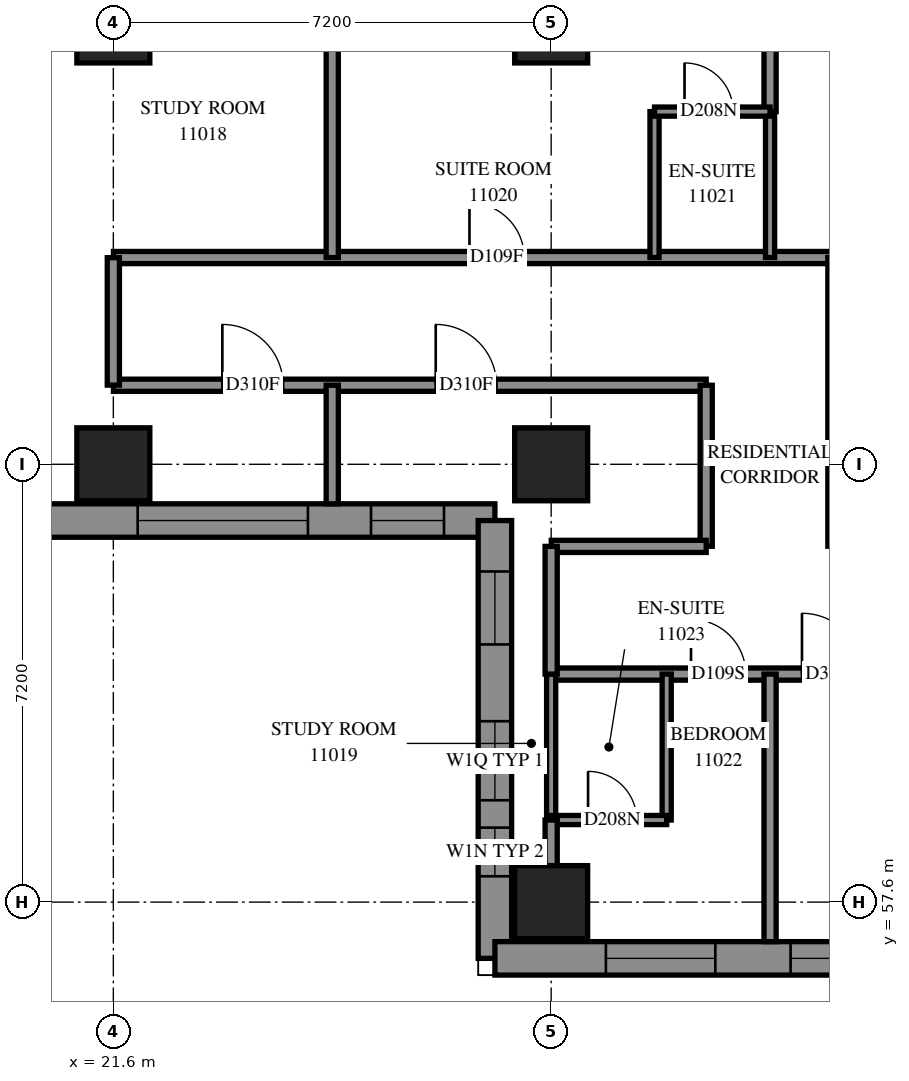
"""IFC4 building model, lengths in metres.
Left out: names, types, materials, properties, quantities, classifications, styles, units other than length and angle.
Written with IfcOpenShell. Run it as: python <this file> out.ifc"""

import sys

from ifc_helpers import new_model, si_unit, direction, frame, frame_2d, origin, origin_2d, place, context, subcontext, project, spatial, polyline, rectangle, outline, extrude, element, fill, save


model = new_model("IFC4")
c1 = context("Model", 3, precision=1e-05, world=origin(), true_north=direction((0.0, 1.0)))
c2 = subcontext(c1, "Body", "Model", "MODEL_VIEW")
j1 = project(units=[si_unit("LENGTHUNIT", "METRE"), si_unit("PLANEANGLEUNIT", "RADIAN")], contexts=[c1])
p1 = place(None, origin())
s1 = spatial("IfcSite", under=j1, at=p1, CompositionType="ELEMENT")
p2 = place(p1, origin())
s2 = spatial("IfcBuilding", under=s1, at=p2, CompositionType="ELEMENT")
p3 = place(p2, frame((0.0, 0.0, 44.0)))
s3 = spatial("IfcBuildingStorey", under=s2, at=p3, CompositionType="ELEMENT", Elevation=44.0)
for number, where, z_axis, x_axis in (
    (1, (21.6, 64.8, 0.0), (0.0, 0.0, 1.0), (1.0, 0.0, 0.0)),
    (2, (21.6, 72.0, 0.0), (0.0, 0.0, 1.0), (1.0, 0.0, 0.0)),
    (3, (28.8, 57.6, 0.0), (0.0, 0.0, 1.0), (1.0, 0.0, 0.0)),
    (4, (28.8, 64.8, 0.0), (0.0, 0.0, 1.0), (1.0, 0.0, 0.0)),
    (5, (28.8, 72.0, 0.0), (0.0, 0.0, 1.0), (1.0, 0.0, 0.0)),
):
    element("IfcColumn", number, at=place(p3, frame(where, z_axis=z_axis, x_axis=x_axis)), inside=s3, PredefinedType="COLUMN", context=c2, shape_type="SweptSolid", body=[
        extrude(rectangle(XDim=1.2, YDim=1.2, at=origin_2d()), origin(), (0.0, 0.0, 1.0), 3.1),
    ])
p4 = place(p3, frame((19.624, 63.875, 0.0), z_axis=(0.0, 0.0, 1.0), x_axis=(1.0, 0.0, 0.0)))
e6 = element("IfcWall", 6, at=p4, inside=s3, PredefinedType="SOLIDWALL", context=c2, shape_type="SweptSolid", body=[
    extrude(outline(polyline([(-0.275, -0.275), (7.976, -0.275), (8.526, 0.275), (0.275, 0.275), (-0.275, -0.275)])), origin(), (0.0, 0.0, 1.0), 3.1),
])
p5 = place(p4, frame((2.376, 0.0, 0.5)))
e7 = element("IfcOpeningElement", 7, at=p5, cuts=e6, PredefinedType="OPENING", context=c2, shape_type="SweptSolid", body=[
    extrude(rectangle(XDim=2.8, YDim=2.45, at=frame_2d((1.4, 1.225))), frame((0.0, 0.285, 0.0), z_axis=(0.0, -1.0, 0.0), x_axis=(1.0, 0.0, 0.0)), (0.0, 0.0, 1.0), 0.57),
])
p6 = place(p4, frame((6.213, 0.0, 0.5)))
e8 = element("IfcOpeningElement", 8, at=p6, cuts=e6, PredefinedType="OPENING", context=c2, shape_type="SweptSolid", body=[
    extrude(rectangle(XDim=1.2, YDim=2.45, at=frame_2d((0.6, 1.225))), frame((0.0, 0.285, 0.0), z_axis=(0.0, -1.0, 0.0), x_axis=(1.0, 0.0, 0.0)), (0.0, 0.0, 1.0), 0.57),
])
p7 = place(p3, frame((27.875, 63.875, 0.0), z_axis=(0.0, 0.0, 1.0), x_axis=(0.0, -1.0, 0.0)))
e9 = element("IfcWall", 9, at=p7, inside=s3, PredefinedType="SOLIDWALL", context=c2, shape_type="SweptSolid", body=[
    extrude(outline(polyline([(0.275, -0.275), (7.475, -0.275), (6.925, 0.275), (-0.275, 0.275), (0.275, -0.275)])), origin(), (0.0, 0.0, 1.0), 3.1),
])
p8 = place(p7, frame((0.838, 0.0, 0.5)))
e10 = element("IfcOpeningElement", 10, at=p8, cuts=e9, PredefinedType="OPENING", context=c2, shape_type="SweptSolid", body=[
    extrude(rectangle(XDim=1.2, YDim=2.45, at=frame_2d((0.6, 1.225))), frame((0.0, 0.285, 0.0), z_axis=(0.0, -1.0, 0.0), x_axis=(1.0, 0.0, 0.0)), (0.0, 0.0, 1.0), 0.57),
])
p9 = place(p7, frame((3.3, 0.0, 0.45)))
e11 = element("IfcOpeningElement", 11, at=p9, cuts=e9, PredefinedType="OPENING", context=c2, shape_type="SweptSolid", body=[
    extrude(rectangle(XDim=1.3, YDim=2.5, at=frame_2d((0.65, 1.25))), frame((0.0, 0.285, 0.0), z_axis=(0.0, -1.0, 0.0), x_axis=(1.0, 0.0, 0.0)), (0.0, 0.0, 1.0), 0.57),
])
p10 = place(p7, frame((5.05, 0.0, 0.45)))
e12 = element("IfcOpeningElement", 12, at=p10, cuts=e9, PredefinedType="OPENING", context=c2, shape_type="SweptSolid", body=[
    extrude(rectangle(XDim=0.8, YDim=2.5, at=frame_2d((0.4, 1.25))), frame((0.0, 0.285, 0.0), z_axis=(0.0, -1.0, 0.0), x_axis=(1.0, 0.0, 0.0)), (0.0, 0.0, 1.0), 0.57),
])
p11 = place(p3, frame((27.875, 56.675, 0.0), z_axis=(0.0, 0.0, 1.0), x_axis=(1.0, 0.0, 0.0)))
e13 = element("IfcWall", 13, at=p11, inside=s3, PredefinedType="SOLIDWALL", context=c2, shape_type="SweptSolid", body=[
    extrude(outline(polyline([(-0.275, -0.275), (6.925, -0.275), (7.475, 0.275), (0.275, 0.275), (-0.275, -0.275)])), origin(), (0.0, 0.0, 1.0), 3.1),
])
p12 = place(p11, frame((1.825, 0.0, 0.6)))
e14 = element("IfcOpeningElement", 14, at=p12, cuts=e13, PredefinedType="OPENING", context=c2, shape_type="SweptSolid", body=[
    extrude(rectangle(XDim=1.8, YDim=1.9, at=frame_2d((0.9, 0.95))), frame((0.0, 0.285, 0.0), z_axis=(0.0, -1.0, 0.0), x_axis=(1.0, 0.0, 0.0)), (0.0, 0.0, 1.0), 0.57),
])
p13 = place(p11, frame((4.862, 0.0, 0.6)))
e15 = element("IfcOpeningElement", 15, at=p13, cuts=e13, PredefinedType="OPENING", context=c2, shape_type="SweptSolid", body=[
    extrude(rectangle(XDim=1.8, YDim=1.9, at=frame_2d((0.9, 0.95))), frame((0.0, 0.285, 0.0), z_axis=(0.0, -1.0, 0.0), x_axis=(1.0, 0.0, 0.0)), (0.0, 0.0, 1.0), 0.57),
])
p14 = place(p3, frame((28.8, 61.35, 0.0), z_axis=(0.0, 0.0, 1.0), x_axis=(1.0, 0.0, 0.0)))
e16 = element("IfcWall", 16, at=p14, inside=s3, PredefinedType="PARTITIONING", context=c2, shape_type="SweptSolid", body=[
    extrude(rectangle(XDim=24.15, YDim=0.2, at=frame_2d((12.075, 0.0))), origin(), (0.0, 0.0, 1.0), 3.1),
])
p15 = place(p14, frame((2.3, 0.0, 0.0)))
e17 = element("IfcOpeningElement", 17, at=p15, cuts=e16, PredefinedType="OPENING", context=c2, shape_type="SweptSolid", body=[
    extrude(rectangle(XDim=0.9, YDim=2.1, at=frame_2d((0.45, 1.05))), frame((0.0, 0.11, 0.0), z_axis=(0.0, -1.0, 0.0), x_axis=(1.0, 0.0, 0.0)), (0.0, 0.0, 1.0), 0.22),
])
p16 = place(p14, frame((4.125, 0.0, 0.0)))
e18 = element("IfcOpeningElement", 18, at=p16, cuts=e16, PredefinedType="OPENING", context=c2, shape_type="SweptSolid", body=[
    extrude(rectangle(XDim=1.0, YDim=2.1, at=frame_2d((0.5, 1.05))), frame((0.0, 0.11, 0.0), z_axis=(0.0, -1.0, 0.0), x_axis=(1.0, 0.0, 0.0)), (0.0, 0.0, 1.0), 0.22),
])
p17 = place(p14, frame((11.061, 0.0, 0.0)))
e19 = element("IfcOpeningElement", 19, at=p17, cuts=e16, PredefinedType="OPENING", context=c2, shape_type="SweptSolid", body=[
    extrude(rectangle(XDim=0.9, YDim=2.1, at=frame_2d((0.45, 1.05))), frame((0.0, 0.11, 0.0), z_axis=(0.0, -1.0, 0.0), x_axis=(1.0, 0.0, 0.0)), (0.0, 0.0, 1.0), 0.22),
])
p18 = place(p14, frame((16.7, 0.0, 0.0)))
e20 = element("IfcOpeningElement", 20, at=p18, cuts=e16, PredefinedType="OPENING", context=c2, shape_type="SweptSolid", body=[
    extrude(rectangle(XDim=0.9, YDim=2.1, at=frame_2d((0.45, 1.05))), frame((0.0, 0.11, 0.0), z_axis=(0.0, -1.0, 0.0), x_axis=(1.0, 0.0, 0.0)), (0.0, 0.0, 1.0), 0.22),
])
p19 = place(p14, frame((18.508, 0.0, 0.0)))
e21 = element("IfcOpeningElement", 21, at=p19, cuts=e16, PredefinedType="OPENING", context=c2, shape_type="SweptSolid", body=[
    extrude(rectangle(XDim=1.0, YDim=2.1, at=frame_2d((0.5, 1.05))), frame((0.0, 0.11, 0.0), z_axis=(0.0, -1.0, 0.0), x_axis=(1.0, 0.0, 0.0)), (0.0, 0.0, 1.0), 0.22),
])
p20 = place(p14, frame((22.882, 0.0, 0.0)))
e22 = element("IfcOpeningElement", 22, at=p20, cuts=e16, PredefinedType="OPENING", context=c2, shape_type="SweptSolid", body=[
    extrude(rectangle(XDim=1.0, YDim=2.1, at=frame_2d((0.5, 1.05))), frame((0.0, 0.11, 0.0), z_axis=(0.0, -1.0, 0.0), x_axis=(1.0, 0.0, 0.0)), (0.0, 0.0, 1.0), 0.22),
])
p21 = place(p3, frame((21.602, 68.2, 0.0), z_axis=(0.0, 0.0, 1.0), x_axis=(1.0, 0.0, 0.0)))
e23 = element("IfcWall", 23, at=p21, inside=s3, PredefinedType="PARTITIONING", context=c2, shape_type="SweptSolid", body=[
    extrude(rectangle(XDim=11.848, YDim=0.2, at=frame_2d((5.924, 0.0))), origin(), (0.0, 0.0, 1.0), 3.1),
])
p22 = place(p21, frame((5.855, 0.0, 0.0)))
e24 = element("IfcOpeningElement", 24, at=p22, cuts=e23, PredefinedType="OPENING", context=c2, shape_type="SweptSolid", body=[
    extrude(rectangle(XDim=0.9, YDim=2.1, at=frame_2d((0.45, 1.05))), frame((0.0, 0.11, 0.0), z_axis=(0.0, -1.0, 0.0), x_axis=(1.0, 0.0, 0.0)), (0.0, 0.0, 1.0), 0.22),
])
p23 = place(p3, frame((21.602, 66.1, 0.0), z_axis=(0.0, 0.0, 1.0), x_axis=(1.0, 0.0, 0.0)))
e25 = element("IfcWall", 25, at=p23, inside=s3, PredefinedType="PARTITIONING", context=c2, shape_type="SweptSolid", body=[
    extrude(rectangle(XDim=9.748, YDim=0.2, at=frame_2d((4.874, 0.0))), origin(), (0.0, 0.0, 1.0), 3.1),
])
p24 = place(p23, frame((1.791, 0.0, 0.0)))
e26 = element("IfcOpeningElement", 26, at=p24, cuts=e25, PredefinedType="OPENING", context=c2, shape_type="SweptSolid", body=[
    extrude(rectangle(XDim=1.0, YDim=2.1, at=frame_2d((0.5, 1.05))), frame((0.0, 0.11, 0.0), z_axis=(0.0, -1.0, 0.0), x_axis=(1.0, 0.0, 0.0)), (0.0, 0.0, 1.0), 0.22),
])
p25 = place(p23, frame((5.3, 0.0, 0.0)))
e27 = element("IfcOpeningElement", 27, at=p25, cuts=e25, PredefinedType="OPENING", context=c2, shape_type="SweptSolid", body=[
    extrude(rectangle(XDim=1.0, YDim=2.1, at=frame_2d((0.5, 1.05))), frame((0.0, 0.11, 0.0), z_axis=(0.0, -1.0, 0.0), x_axis=(1.0, 0.0, 0.0)), (0.0, 0.0, 1.0), 0.22),
])
p26 = place(p3, frame((33.45, 63.452, 0.0), z_axis=(0.0, 0.0, 1.0), x_axis=(0.0, 1.0, 0.0)))
e28 = element("IfcWall", 28, at=p26, inside=s3, PredefinedType="PARTITIONING", context=c2, shape_type="SweptSolid", body=[
    extrude(rectangle(XDim=4.748, YDim=0.2, at=frame_2d((2.374, 0.0))), origin(), (0.0, 0.0, 1.0), 3.1),
])
p27 = place(p3, frame((25.2, 68.2, 0.0), z_axis=(0.0, 0.0, 1.0), x_axis=(0.0, 1.0, 0.0)))
e29 = element("IfcWall", 29, at=p27, inside=s3, PredefinedType="PARTITIONING", context=c2, shape_type="SweptSolid", body=[
    extrude(rectangle(XDim=4.69, YDim=0.2, at=frame_2d((2.345, 0.0))), origin(), (0.0, 0.0, 1.0), 3.1),
])
p28 = place(p3, frame((32.4, 56.95, 0.0), z_axis=(0.0, 0.0, 1.0), x_axis=(0.0, 1.0, 0.0)))
e30 = element("IfcWall", 30, at=p28, inside=s3, PredefinedType="PARTITIONING", context=c2, shape_type="SweptSolid", body=[
    extrude(rectangle(XDim=4.4, YDim=0.2, at=frame_2d((2.2, 0.0))), origin(), (0.0, 0.0, 1.0), 3.1),
])
p29 = place(p3, frame((31.35, 63.452, 0.0), z_axis=(0.0, 0.0, 1.0), x_axis=(0.0, 1.0, 0.0)))
e31 = element("IfcWall", 31, at=p29, inside=s3, PredefinedType="PARTITIONING", context=c2, shape_type="SweptSolid", body=[
    extrude(rectangle(XDim=2.648, YDim=0.2, at=frame_2d((1.324, 0.0))), origin(), (0.0, 0.0, 1.0), 3.1),
])
p30 = place(p3, frame((28.802, 63.45, 0.0), z_axis=(0.0, 0.0, 1.0), x_axis=(1.0, 0.0, 0.0)))
e32 = element("IfcWall", 32, at=p30, inside=s3, PredefinedType="PARTITIONING", context=c2, shape_type="SweptSolid", body=[
    extrude(rectangle(XDim=2.548, YDim=0.2, at=frame_2d((1.274, 0.0))), origin(), (0.0, 0.0, 1.0), 3.1),
])
p31 = place(p3, frame((30.7, 58.95, 0.0), z_axis=(0.0, 0.0, 1.0), x_axis=(0.0, 1.0, 0.0)))
e33 = element("IfcWall", 33, at=p31, inside=s3, PredefinedType="PARTITIONING", context=c2, shape_type="SweptSolid", body=[
    extrude(rectangle(XDim=2.4, YDim=0.15, at=frame_2d((1.2, 0.0))), origin(), (0.0, 0.0, 1.0), 3.1),
])
p32 = place(p3, frame((28.8, 58.95, 0.0), z_axis=(0.0, 0.0, 1.0), x_axis=(0.0, 1.0, 0.0)))
e34 = element("IfcWall", 34, at=p32, inside=s3, PredefinedType="PARTITIONING", context=c2, shape_type="SweptSolid", body=[
    extrude(rectangle(XDim=2.4, YDim=0.15, at=frame_2d((1.2, 0.0))), origin(), (0.0, 0.0, 1.0), 2.6),
])
for number, where, z_axis, x_axis in (
    (35, (30.5, 68.2, 0.0), (0.0, 0.0, 1.0), (0.0, 1.0, 0.0)),
    (36, (32.4, 68.2, 0.0), (0.0, 0.0, 1.0), (0.0, 1.0, 0.0)),
):
    element("IfcWall", number, at=place(p3, frame(where, z_axis=z_axis, x_axis=x_axis)), inside=s3, PredefinedType="PARTITIONING", context=c2, shape_type="SweptSolid", body=[
        extrude(rectangle(XDim=2.4, YDim=0.15, at=frame_2d((1.2, 0.0))), origin(), (0.0, 0.0, 1.0), 3.1),
    ])
p33 = place(p3, frame((32.4, 70.6, 0.0), z_axis=(0.0, 0.0, 1.0), x_axis=(0.0, 1.0, 0.0)))
e37 = element("IfcWall", 37, at=p33, inside=s3, PredefinedType="PARTITIONING", context=c2, shape_type="SweptSolid", body=[
    extrude(rectangle(XDim=2.243, YDim=0.2, at=frame_2d((1.121, 0.0))), origin(), (0.0, 0.0, 1.0), 3.1),
])
p34 = place(p3, frame((28.8, 61.35, 0.0), z_axis=(0.0, 0.0, 1.0), x_axis=(0.0, 1.0, 0.0)))
e38 = element("IfcWall", 38, at=p34, inside=s3, PredefinedType="PARTITIONING", context=c2, shape_type="SweptSolid", body=[
    extrude(rectangle(XDim=2.1, YDim=0.2, at=frame_2d((1.05, 0.0))), origin(), (0.0, 0.0, 1.0), 2.6),
])
p35 = place(p3, frame((21.6, 66.102, 0.0), z_axis=(0.0, 0.0, 1.0), x_axis=(0.0, 1.0, 0.0)))
e39 = element("IfcWall", 39, at=p35, inside=s3, PredefinedType="PARTITIONING", context=c2, shape_type="SweptSolid", body=[
    extrude(rectangle(XDim=2.096, YDim=0.2, at=frame_2d((1.048, 0.0))), origin(), (0.0, 0.0, 1.0), 2.6),
])
p36 = place(p3, frame((28.8, 58.95, 0.0), z_axis=(0.0, 0.0, 1.0), x_axis=(1.0, 0.0, 0.0)))
e40 = element("IfcWall", 40, at=p36, inside=s3, PredefinedType="PARTITIONING", context=c2, shape_type="SweptSolid", body=[
    extrude(rectangle(XDim=1.9, YDim=0.15, at=frame_2d((0.95, 0.0))), origin(), (0.0, 0.0, 1.0), 3.1),
])
p37 = place(p36, frame((0.607, 0.0, 0.0)))
e41 = element("IfcOpeningElement", 41, at=p37, cuts=e40, PredefinedType="OPENING", context=c2, shape_type="SweptSolid", body=[
    extrude(rectangle(XDim=0.8, YDim=2.1, at=frame_2d((0.4, 1.05))), frame((0.0, 0.085, 0.0), z_axis=(0.0, -1.0, 0.0), x_axis=(1.0, 0.0, 0.0)), (0.0, 0.0, 1.0), 0.17),
])
p38 = place(p3, frame((30.5, 70.6, 0.0), z_axis=(0.0, 0.0, 1.0), x_axis=(1.0, 0.0, 0.0)))
e42 = element("IfcWall", 42, at=p38, inside=s3, PredefinedType="PARTITIONING", context=c2, shape_type="SweptSolid", body=[
    extrude(rectangle(XDim=1.9, YDim=0.15, at=frame_2d((0.95, 0.0))), origin(), (0.0, 0.0, 1.0), 3.1),
])
p39 = place(p38, frame((0.493, 0.0, 0.0)))
e43 = element("IfcOpeningElement", 43, at=p39, cuts=e42, PredefinedType="OPENING", context=c2, shape_type="SweptSolid", body=[
    extrude(rectangle(XDim=0.8, YDim=2.1, at=frame_2d((0.4, 1.05))), frame((0.0, 0.085, 0.0), z_axis=(0.0, -1.0, 0.0), x_axis=(1.0, 0.0, 0.0)), (0.0, 0.0, 1.0), 0.17),
])
p40 = place(p3, frame((25.2, 64.15, 0.0), z_axis=(0.0, 0.0, 1.0), x_axis=(0.0, 1.0, 0.0)))
e44 = element("IfcWall", 44, at=p40, inside=s3, PredefinedType="PARTITIONING", context=c2, shape_type="SweptSolid", body=[
    extrude(rectangle(XDim=1.95, YDim=0.2, at=frame_2d((0.975, 0.0))), origin(), (0.0, 0.0, 1.0), 3.1),
])
p41 = place(p3, frame((28.8, 58.2, 0.0), z_axis=(0.0, 0.0, 1.0), x_axis=(0.0, 1.0, 0.0)))
e45 = element("IfcWall", 45, at=p41, inside=s3, PredefinedType="PARTITIONING", context=c2, shape_type="SweptSolid", body=[
    extrude(rectangle(XDim=0.75, YDim=0.2, at=frame_2d((0.375, 0.0))), origin(), (0.0, 0.0, 1.0), 2.6),
])
p42 = place(p5, origin())
e46 = element("IfcWindow", 46, at=p42, inside=s3, PartitioningType="SINGLE_PANEL", PredefinedType="WINDOW", context=c2, shape_type="SweptSolid", body=[
    extrude(rectangle(XDim=2.8, YDim=2.45, at=frame_2d((1.4, 1.225))), frame((0.0, 0.155, 0.0), z_axis=(0.0, -1.0, 0.0), x_axis=(1.0, 0.0, 0.0)), (0.0, 0.0, 1.0), 0.06),
])
fill(e7, e46)
p43 = place(p6, origin())
e47 = element("IfcWindow", 47, at=p43, inside=s3, PartitioningType="SINGLE_PANEL", PredefinedType="WINDOW", context=c2, shape_type="SweptSolid", body=[
    extrude(rectangle(XDim=1.2, YDim=2.45, at=frame_2d((0.6, 1.225))), frame((0.0, 0.155, 0.0), z_axis=(0.0, -1.0, 0.0), x_axis=(1.0, 0.0, 0.0)), (0.0, 0.0, 1.0), 0.06),
])
fill(e8, e47)
p44 = place(p8, origin())
e48 = element("IfcWindow", 48, at=p44, inside=s3, PartitioningType="SINGLE_PANEL", PredefinedType="WINDOW", context=c2, shape_type="SweptSolid", body=[
    extrude(rectangle(XDim=1.2, YDim=2.45, at=frame_2d((0.6, 1.225))), frame((0.0, 0.155, 0.0), z_axis=(0.0, -1.0, 0.0), x_axis=(1.0, 0.0, 0.0)), (0.0, 0.0, 1.0), 0.06),
])
fill(e10, e48)
p45 = place(p12, origin())
e49 = element("IfcWindow", 49, at=p45, inside=s3, PartitioningType="SINGLE_PANEL", PredefinedType="WINDOW", context=c2, shape_type="SweptSolid", body=[
    extrude(rectangle(XDim=1.8, YDim=1.9, at=frame_2d((0.9, 0.95))), frame((0.0, 0.155, 0.0), z_axis=(0.0, -1.0, 0.0), x_axis=(1.0, 0.0, 0.0)), (0.0, 0.0, 1.0), 0.06),
])
fill(e14, e49)
p46 = place(p13, origin())
e50 = element("IfcWindow", 50, at=p46, inside=s3, PartitioningType="SINGLE_PANEL", PredefinedType="WINDOW", context=c2, shape_type="SweptSolid", body=[
    extrude(rectangle(XDim=1.8, YDim=1.9, at=frame_2d((0.9, 0.95))), frame((0.0, 0.155, 0.0), z_axis=(0.0, -1.0, 0.0), x_axis=(1.0, 0.0, 0.0)), (0.0, 0.0, 1.0), 0.06),
])
fill(e15, e50)
p47 = place(p24, origin())
e51 = element("IfcDoor", 51, at=p47, inside=s3, OperationType="SINGLE_SWING_RIGHT", PredefinedType="DOOR", context=c2, shape_type="SweptSolid", body=[
    extrude(rectangle(XDim=1.0, YDim=2.1, at=frame_2d((0.5, 1.05))), frame((0.0, 0.025, 0.0), z_axis=(0.0, -1.0, 0.0), x_axis=(1.0, 0.0, 0.0)), (0.0, 0.0, 1.0), 0.05),
])
fill(e26, e51)
p48 = place(p25, origin())
e52 = element("IfcDoor", 52, at=p48, inside=s3, OperationType="SINGLE_SWING_RIGHT", PredefinedType="DOOR", context=c2, shape_type="SweptSolid", body=[
    extrude(rectangle(XDim=1.0, YDim=2.1, at=frame_2d((0.5, 1.05))), frame((0.0, 0.025, 0.0), z_axis=(0.0, -1.0, 0.0), x_axis=(1.0, 0.0, 0.0)), (0.0, 0.0, 1.0), 0.05),
])
fill(e27, e52)
p49 = place(p22, origin())
e53 = element("IfcDoor", 53, at=p49, inside=s3, OperationType="SINGLE_SWING_LEFT", PredefinedType="DOOR", context=c2, shape_type="SweptSolid", body=[
    extrude(rectangle(XDim=0.9, YDim=2.1, at=frame_2d((0.45, 1.05))), frame((0.0, 0.025, 0.0), z_axis=(0.0, -1.0, 0.0), x_axis=(1.0, 0.0, 0.0)), (0.0, 0.0, 1.0), 0.05),
])
fill(e24, e53)
p50 = place(p39, origin())
e54 = element("IfcDoor", 54, at=p50, inside=s3, OperationType="SINGLE_SWING_RIGHT", PredefinedType="DOOR", context=c2, shape_type="SweptSolid", body=[
    extrude(rectangle(XDim=0.8, YDim=2.1, at=frame_2d((0.4, 1.05))), frame((0.0, 0.025, 0.0), z_axis=(0.0, -1.0, 0.0), x_axis=(1.0, 0.0, 0.0)), (0.0, 0.0, 1.0), 0.05),
])
fill(e43, e54)
p51 = place(p15, origin())
e55 = element("IfcDoor", 55, at=p51, inside=s3, OperationType="SINGLE_SWING_LEFT", PredefinedType="DOOR", context=c2, shape_type="SweptSolid", body=[
    extrude(rectangle(XDim=0.9, YDim=2.1, at=frame_2d((0.45, 1.05))), frame((0.0, 0.025, 0.0), z_axis=(0.0, -1.0, 0.0), x_axis=(1.0, 0.0, 0.0)), (0.0, 0.0, 1.0), 0.05),
])
fill(e17, e55)
p52 = place(p37, origin())
e56 = element("IfcDoor", 56, at=p52, inside=s3, OperationType="SINGLE_SWING_RIGHT", PredefinedType="DOOR", context=c2, shape_type="SweptSolid", body=[
    extrude(rectangle(XDim=0.8, YDim=2.1, at=frame_2d((0.4, 1.05))), frame((0.0, 0.025, 0.0), z_axis=(0.0, -1.0, 0.0), x_axis=(1.0, 0.0, 0.0)), (0.0, 0.0, 1.0), 0.05),
])
fill(e41, e56)
p53 = place(p16, origin())
e57 = element("IfcDoor", 57, at=p53, inside=s3, OperationType="SINGLE_SWING_RIGHT", PredefinedType="DOOR", context=c2, shape_type="SweptSolid", body=[
    extrude(rectangle(XDim=1.0, YDim=2.1, at=frame_2d((0.5, 1.05))), frame((0.0, 0.025, 0.0), z_axis=(0.0, -1.0, 0.0), x_axis=(1.0, 0.0, 0.0)), (0.0, 0.0, 1.0), 0.05),
])
fill(e18, e57)
p54 = place(p9, origin())
e58 = element("IfcWindow", 58, at=p54, inside=s3, PartitioningType="SINGLE_PANEL", PredefinedType="WINDOW", context=c2, shape_type="SweptSolid", body=[
    extrude(rectangle(XDim=1.3, YDim=2.5, at=frame_2d((0.65, 1.25))), frame((0.0, 0.155, 0.0), z_axis=(0.0, -1.0, 0.0), x_axis=(1.0, 0.0, 0.0)), (0.0, 0.0, 1.0), 0.06),
])
fill(e11, e58)
p55 = place(p10, origin())
e59 = element("IfcWindow", 59, at=p55, inside=s3, PartitioningType="SINGLE_PANEL", PredefinedType="WINDOW", context=c2, shape_type="SweptSolid", body=[
    extrude(rectangle(XDim=0.8, YDim=2.5, at=frame_2d((0.4, 1.25))), frame((0.0, 0.155, 0.0), z_axis=(0.0, -1.0, 0.0), x_axis=(1.0, 0.0, 0.0)), (0.0, 0.0, 1.0), 0.06),
])
fill(e12, e59)
save(model, sys.argv[1])
